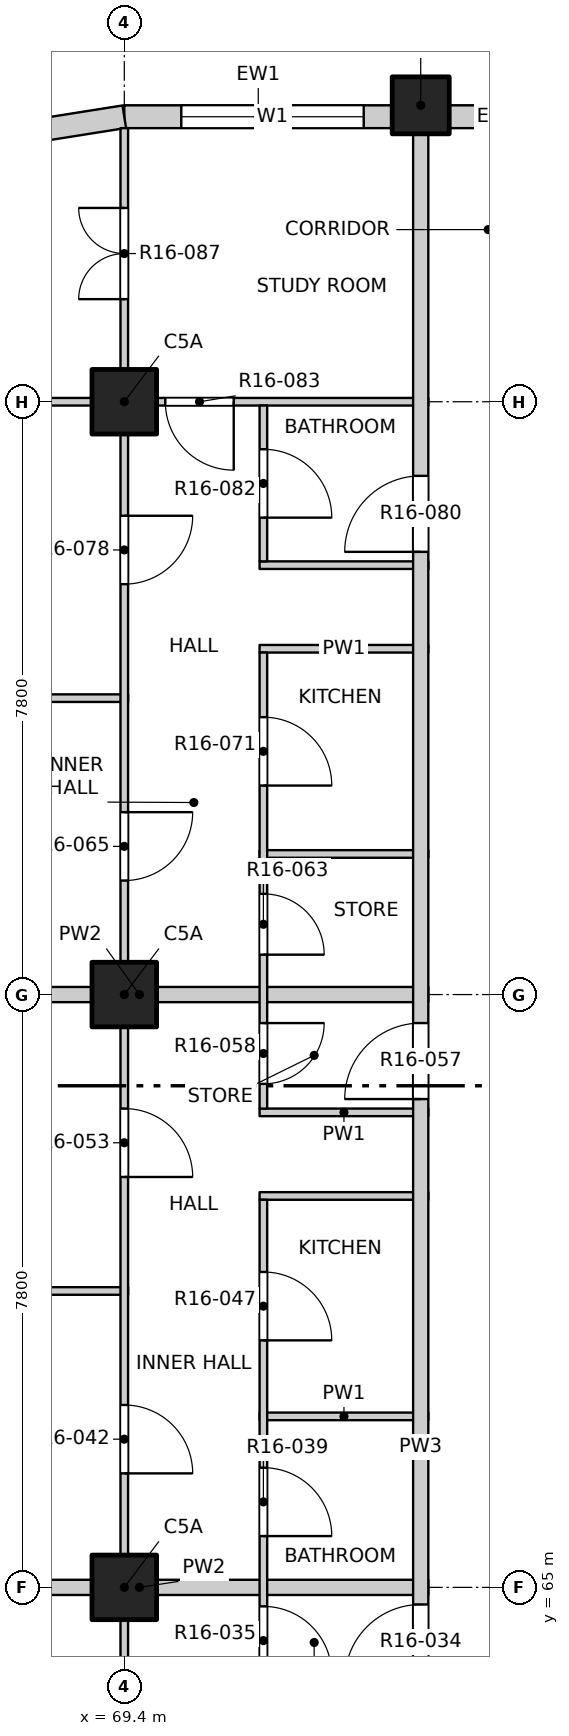
"""IFC4 building model, lengths in metres.
Left out: names, types, materials, properties, quantities, classifications, styles, units other than length and angle.
Written with IfcOpenShell. Run it as: python <this file> out.ifc"""

import sys

from ifc_helpers import new_model, si_unit, direction, frame, frame_2d, origin, origin_2d, place, context, subcontext, project, spatial, rectangle, extrude, element, fill, save


model = new_model("IFC4")
c1 = context("Model", 3, precision=1e-05, world=origin(), true_north=direction((0.0, 1.0)))
c2 = subcontext(c1, "Body", "Model", "MODEL_VIEW")
j1 = project(units=[si_unit("LENGTHUNIT", "METRE"), si_unit("PLANEANGLEUNIT", "RADIAN")], contexts=[c1])
p1 = place(None, origin())
s1 = spatial("IfcSite", under=j1, at=p1, CompositionType="ELEMENT")
p2 = place(p1, origin())
s2 = spatial("IfcBuilding", under=s1, at=p2, CompositionType="ELEMENT")
p3 = place(p2, frame((0.0, 0.0, 169.0)))
s3 = spatial("IfcBuildingStorey", under=s2, at=p3, CompositionType="ELEMENT", Elevation=169.0)
p4 = place(p3, frame((73.3, 84.5, -0.25), z_axis=(0.0, 0.0, 1.0), x_axis=(1.0, 0.0, 0.0)))
e1 = element("IfcColumn", 1, at=p4, inside=s3, PredefinedType="COLUMN", context=c2, shape_type="SweptSolid", body=[
    extrude(rectangle(XDim=0.75, YDim=0.75, at=origin_2d()), origin(), (0.0, 0.0, 1.0), 3.35),
])
for number, where, z_axis, x_axis in (
    (2, (69.4, 65.0, -0.25), (0.0, 0.0, 1.0), (1.0, 0.0, 0.0)),
    (3, (69.4, 72.8, -0.25), (0.0, 0.0, 1.0), (1.0, 0.0, 0.0)),
    (4, (69.4, 80.6, -0.25), (0.0, 0.0, 1.0), (1.0, 0.0, 0.0)),
):
    element("IfcColumn", number, at=place(p3, frame(where, z_axis=z_axis, x_axis=x_axis)), inside=s3, PredefinedType="COLUMN", context=c2, shape_type="SweptSolid", body=[
        extrude(rectangle(XDim=0.85, YDim=0.85, at=origin_2d()), origin(), (0.0, 0.0, 1.0), 3.35),
    ])
p5 = place(p3, frame((69.4, 84.35, 0.0), z_axis=(0.0, 0.0, 1.0), x_axis=(1.0, 0.0, 0.0)))
e5 = element("IfcWall", 5, at=p5, inside=s3, PredefinedType="SOLIDWALL", context=c2, shape_type="SweptSolid", body=[
    extrude(rectangle(XDim=3.525, YDim=0.3, at=frame_2d((1.763, 0.0))), origin(), (0.0, 0.0, 1.0), 3.1),
])
p6 = place(p5, frame((0.75, 0.0, 0.9)))
e6 = element("IfcOpeningElement", 6, at=p6, cuts=e5, PredefinedType="OPENING", context=c2, shape_type="SweptSolid", body=[
    extrude(rectangle(XDim=2.4, YDim=1.8, at=frame_2d((1.2, 0.9))), frame((0.0, 0.16, 0.0), z_axis=(0.0, -1.0, 0.0), x_axis=(1.0, 0.0, 0.0)), (0.0, 0.0, 1.0), 0.32),
])
p7 = place(p3, frame((73.675, 84.35, 0.0), z_axis=(0.0, 0.0, 1.0), x_axis=(1.0, 0.0, 0.0)))
e7 = element("IfcWall", 7, at=p7, inside=s3, PredefinedType="SOLIDWALL", context=c2, shape_type="SweptSolid", body=[
    extrude(rectangle(XDim=1.3, YDim=0.3, at=frame_2d((0.65, 0.0))), origin(), (0.0, 0.0, 1.0), 3.1),
])
p8 = place(p3, frame((69.4, 84.35, 0.0), z_axis=(0.0, 0.0, 1.0), x_axis=(-0.987678452879, -0.156496880861, 0.0)))
e8 = element("IfcWall", 8, at=p8, inside=s3, PredefinedType="SOLIDWALL", context=c2, shape_type="SweptSolid", body=[
    extrude(rectangle(XDim=1.173, YDim=0.3, at=frame_2d((0.586, 0.0))), origin(), (0.0, 0.0, 1.0), 3.1),
])
p9 = place(p3, frame((65.8, 65.0, 0.0), z_axis=(0.0, 0.0, 1.0), x_axis=(1.0, 0.0, 0.0)))
e9 = element("IfcWall", 9, at=p9, inside=s3, PredefinedType="PARTITIONING", context=c2, shape_type="SweptSolid", body=[
    extrude(rectangle(XDim=7.6, YDim=0.2, at=frame_2d((3.8, 0.0))), origin(), (0.0, 0.0, 1.0), 3.1),
])
p10 = place(p3, frame((71.18, 67.25, 0.0), z_axis=(0.0, 0.0, 1.0), x_axis=(1.0, 0.0, 0.0)))
e10 = element("IfcWall", 10, at=p10, inside=s3, PredefinedType="PARTITIONING", context=c2, shape_type="SweptSolid", body=[
    extrude(rectangle(XDim=2.22, YDim=0.1, at=frame_2d((1.11, 0.0))), origin(), (0.0, 0.0, 1.0), 3.1),
])
p11 = place(p3, frame((65.8, 68.9, 0.0), z_axis=(0.0, 0.0, 1.0), x_axis=(1.0, 0.0, 0.0)))
e11 = element("IfcWall", 11, at=p11, inside=s3, PredefinedType="PARTITIONING", context=c2, shape_type="SweptSolid", body=[
    extrude(rectangle(XDim=3.65, YDim=0.1, at=frame_2d((1.825, 0.0))), origin(), (0.0, 0.0, 1.0), 3.1),
])
for number, where, z_axis, x_axis in (
    (12, (71.18, 70.15, 0.0), (0.0, 0.0, 1.0), (1.0, 0.0, 0.0)),
    (13, (71.18, 71.25, 0.0), (0.0, 0.0, 1.0), (1.0, 0.0, 0.0)),
):
    element("IfcWall", number, at=place(p3, frame(where, z_axis=z_axis, x_axis=x_axis)), inside=s3, PredefinedType="PARTITIONING", context=c2, shape_type="SweptSolid", body=[
        extrude(rectangle(XDim=2.22, YDim=0.1, at=frame_2d((1.11, 0.0))), origin(), (0.0, 0.0, 1.0), 3.1),
    ])
p12 = place(p3, frame((65.8, 72.8, 0.0), z_axis=(0.0, 0.0, 1.0), x_axis=(1.0, 0.0, 0.0)))
e14 = element("IfcWall", 14, at=p12, inside=s3, PredefinedType="PARTITIONING", context=c2, shape_type="SweptSolid", body=[
    extrude(rectangle(XDim=7.6, YDim=0.2, at=frame_2d((3.8, 0.0))), origin(), (0.0, 0.0, 1.0), 3.1),
])
p13 = place(p3, frame((71.18, 74.65, 0.0), z_axis=(0.0, 0.0, 1.0), x_axis=(1.0, 0.0, 0.0)))
e15 = element("IfcWall", 15, at=p13, inside=s3, PredefinedType="PARTITIONING", context=c2, shape_type="SweptSolid", body=[
    extrude(rectangle(XDim=2.22, YDim=0.1, at=frame_2d((1.11, 0.0))), origin(), (0.0, 0.0, 1.0), 3.1),
])
p14 = place(p3, frame((65.8, 76.7, 0.0), z_axis=(0.0, 0.0, 1.0), x_axis=(1.0, 0.0, 0.0)))
e16 = element("IfcWall", 16, at=p14, inside=s3, PredefinedType="PARTITIONING", context=c2, shape_type="SweptSolid", body=[
    extrude(rectangle(XDim=3.65, YDim=0.1, at=frame_2d((1.825, 0.0))), origin(), (0.0, 0.0, 1.0), 3.1),
])
for number, where, z_axis, x_axis in (
    (17, (71.18, 77.35, 0.0), (0.0, 0.0, 1.0), (1.0, 0.0, 0.0)),
    (18, (71.18, 78.45, 0.0), (0.0, 0.0, 1.0), (1.0, 0.0, 0.0)),
):
    element("IfcWall", number, at=place(p3, frame(where, z_axis=z_axis, x_axis=x_axis)), inside=s3, PredefinedType="PARTITIONING", context=c2, shape_type="SweptSolid", body=[
        extrude(rectangle(XDim=2.22, YDim=0.1, at=frame_2d((1.11, 0.0))), origin(), (0.0, 0.0, 1.0), 3.1),
    ])
p15 = place(p3, frame((65.8, 80.6, 0.0), z_axis=(0.0, 0.0, 1.0), x_axis=(1.0, 0.0, 0.0)))
e19 = element("IfcWall", 19, at=p15, inside=s3, PredefinedType="PARTITIONING", context=c2, shape_type="SweptSolid", body=[
    extrude(rectangle(XDim=7.6, YDim=0.1, at=frame_2d((3.8, 0.0))), origin(), (0.0, 0.0, 1.0), 3.1),
])
p16 = place(p15, frame((4.14, 0.0, 0.0)))
e20 = element("IfcOpeningElement", 20, at=p16, cuts=e19, PredefinedType="OPENING", context=c2, shape_type="SweptSolid", body=[
    extrude(rectangle(XDim=0.9, YDim=2.1, at=frame_2d((0.45, 1.05))), frame((0.0, 0.06, 0.0), z_axis=(0.0, -1.0, 0.0), x_axis=(1.0, 0.0, 0.0)), (0.0, 0.0, 1.0), 0.12),
])
p17 = place(p3, frame((69.4, 45.8, 0.0), z_axis=(0.0, 0.0, 1.0), x_axis=(0.0, 1.0, 0.0)))
e21 = element("IfcWall", 21, at=p17, inside=s3, PredefinedType="PARTITIONING", context=c2, shape_type="SweptSolid", body=[
    extrude(rectangle(XDim=38.4, YDim=0.1, at=frame_2d((19.2, 0.0))), origin(), (0.0, 0.0, 1.0), 3.1),
])
p18 = place(p17, frame((1.05, 0.0, 0.0)))
e22 = element("IfcOpeningElement", 22, at=p18, cuts=e21, PredefinedType="OPENING", context=c2, shape_type="SweptSolid", body=[
    extrude(rectangle(XDim=1.2, YDim=2.1, at=frame_2d((0.6, 1.05))), frame((0.0, 0.06, 0.0), z_axis=(0.0, -1.0, 0.0), x_axis=(1.0, 0.0, 0.0)), (0.0, 0.0, 1.0), 0.12),
])
p19 = place(p17, frame((5.1, 0.0, 0.0)))
e23 = element("IfcOpeningElement", 23, at=p19, cuts=e21, PredefinedType="OPENING", context=c2, shape_type="SweptSolid", body=[
    extrude(rectangle(XDim=0.9, YDim=2.1, at=frame_2d((0.45, 1.05))), frame((0.0, 0.06, 0.0), z_axis=(0.0, -1.0, 0.0), x_axis=(1.0, 0.0, 0.0)), (0.0, 0.0, 1.0), 0.12),
])
p20 = place(p17, frame((9.0, 0.0, 0.0)))
e24 = element("IfcOpeningElement", 24, at=p20, cuts=e21, PredefinedType="OPENING", context=c2, shape_type="SweptSolid", body=[
    extrude(rectangle(XDim=0.9, YDim=2.1, at=frame_2d((0.45, 1.05))), frame((0.0, 0.06, 0.0), z_axis=(0.0, -1.0, 0.0), x_axis=(1.0, 0.0, 0.0)), (0.0, 0.0, 1.0), 0.12),
])
p21 = place(p17, frame((12.9, 0.0, 0.0)))
e25 = element("IfcOpeningElement", 25, at=p21, cuts=e21, PredefinedType="OPENING", context=c2, shape_type="SweptSolid", body=[
    extrude(rectangle(XDim=0.9, YDim=2.1, at=frame_2d((0.45, 1.05))), frame((0.0, 0.06, 0.0), z_axis=(0.0, -1.0, 0.0), x_axis=(1.0, 0.0, 0.0)), (0.0, 0.0, 1.0), 0.12),
])
p22 = place(p17, frame((16.8, 0.0, 0.0)))
e26 = element("IfcOpeningElement", 26, at=p22, cuts=e21, PredefinedType="OPENING", context=c2, shape_type="SweptSolid", body=[
    extrude(rectangle(XDim=0.9, YDim=2.1, at=frame_2d((0.45, 1.05))), frame((0.0, 0.06, 0.0), z_axis=(0.0, -1.0, 0.0), x_axis=(1.0, 0.0, 0.0)), (0.0, 0.0, 1.0), 0.12),
])
p23 = place(p17, frame((20.7, 0.0, 0.0)))
e27 = element("IfcOpeningElement", 27, at=p23, cuts=e21, PredefinedType="OPENING", context=c2, shape_type="SweptSolid", body=[
    extrude(rectangle(XDim=0.9, YDim=2.1, at=frame_2d((0.45, 1.05))), frame((0.0, 0.06, 0.0), z_axis=(0.0, -1.0, 0.0), x_axis=(1.0, 0.0, 0.0)), (0.0, 0.0, 1.0), 0.12),
])
p24 = place(p17, frame((24.6, 0.0, 0.0)))
e28 = element("IfcOpeningElement", 28, at=p24, cuts=e21, PredefinedType="OPENING", context=c2, shape_type="SweptSolid", body=[
    extrude(rectangle(XDim=0.9, YDim=2.1, at=frame_2d((0.45, 1.05))), frame((0.0, 0.06, 0.0), z_axis=(0.0, -1.0, 0.0), x_axis=(1.0, 0.0, 0.0)), (0.0, 0.0, 1.0), 0.12),
])
p25 = place(p17, frame((28.5, 0.0, 0.0)))
e29 = element("IfcOpeningElement", 29, at=p25, cuts=e21, PredefinedType="OPENING", context=c2, shape_type="SweptSolid", body=[
    extrude(rectangle(XDim=0.9, YDim=2.1, at=frame_2d((0.45, 1.05))), frame((0.0, 0.06, 0.0), z_axis=(0.0, -1.0, 0.0), x_axis=(1.0, 0.0, 0.0)), (0.0, 0.0, 1.0), 0.12),
])
p26 = place(p17, frame((32.4, 0.0, 0.0)))
e30 = element("IfcOpeningElement", 30, at=p26, cuts=e21, PredefinedType="OPENING", context=c2, shape_type="SweptSolid", body=[
    extrude(rectangle(XDim=0.9, YDim=2.1, at=frame_2d((0.45, 1.05))), frame((0.0, 0.06, 0.0), z_axis=(0.0, -1.0, 0.0), x_axis=(1.0, 0.0, 0.0)), (0.0, 0.0, 1.0), 0.12),
])
p27 = place(p17, frame((36.15, 0.0, 0.0)))
e31 = element("IfcOpeningElement", 31, at=p27, cuts=e21, PredefinedType="OPENING", context=c2, shape_type="SweptSolid", body=[
    extrude(rectangle(XDim=1.2, YDim=2.1, at=frame_2d((0.6, 1.05))), frame((0.0, 0.06, 0.0), z_axis=(0.0, -1.0, 0.0), x_axis=(1.0, 0.0, 0.0)), (0.0, 0.0, 1.0), 0.12),
])
p28 = place(p3, frame((71.23, 63.65, 0.0), z_axis=(0.0, 0.0, 1.0), x_axis=(0.0, 1.0, 0.0)))
e32 = element("IfcWall", 32, at=p28, inside=s3, PredefinedType="PARTITIONING", context=c2, shape_type="SweptSolid", body=[
    extrude(rectangle(XDim=6.45, YDim=0.1, at=frame_2d((3.225, 0.0))), origin(), (0.0, 0.0, 1.0), 3.1),
])
p29 = place(p28, frame((0.2, 0.0, 0.0)))
e33 = element("IfcOpeningElement", 33, at=p29, cuts=e32, PredefinedType="OPENING", context=c2, shape_type="SweptSolid", body=[
    extrude(rectangle(XDim=0.9, YDim=2.1, at=frame_2d((0.45, 1.05))), frame((0.0, 0.06, 0.0), z_axis=(0.0, -1.0, 0.0), x_axis=(1.0, 0.0, 0.0)), (0.0, 0.0, 1.0), 0.12),
])
p30 = place(p28, frame((2.025, 0.0, 0.0)))
e34 = element("IfcOpeningElement", 34, at=p30, cuts=e32, PredefinedType="OPENING", context=c2, shape_type="SweptSolid", body=[
    extrude(rectangle(XDim=0.9, YDim=2.1, at=frame_2d((0.45, 1.05))), frame((0.0, 0.06, 0.0), z_axis=(0.0, -1.0, 0.0), x_axis=(1.0, 0.0, 0.0)), (0.0, 0.0, 1.0), 0.12),
])
p31 = place(p28, frame((4.6, 0.0, 0.0)))
e35 = element("IfcOpeningElement", 35, at=p31, cuts=e32, PredefinedType="OPENING", context=c2, shape_type="SweptSolid", body=[
    extrude(rectangle(XDim=0.9, YDim=2.1, at=frame_2d((0.45, 1.05))), frame((0.0, 0.06, 0.0), z_axis=(0.0, -1.0, 0.0), x_axis=(1.0, 0.0, 0.0)), (0.0, 0.0, 1.0), 0.12),
])
p32 = place(p3, frame((71.23, 71.3, 0.0), z_axis=(0.0, 0.0, 1.0), x_axis=(0.0, 1.0, 0.0)))
e36 = element("IfcWall", 36, at=p32, inside=s3, PredefinedType="PARTITIONING", context=c2, shape_type="SweptSolid", body=[
    extrude(rectangle(XDim=6.0, YDim=0.1, at=frame_2d((3.0, 0.0))), origin(), (0.0, 0.0, 1.0), 3.1),
])
p33 = place(p32, frame((0.325, 0.0, 0.0)))
e37 = element("IfcOpeningElement", 37, at=p33, cuts=e36, PredefinedType="OPENING", context=c2, shape_type="SweptSolid", body=[
    extrude(rectangle(XDim=0.8, YDim=2.1, at=frame_2d((0.4, 1.05))), frame((0.0, 0.06, 0.0), z_axis=(0.0, -1.0, 0.0), x_axis=(1.0, 0.0, 0.0)), (0.0, 0.0, 1.0), 0.12),
])
p34 = place(p32, frame((2.025, 0.0, 0.0)))
e38 = element("IfcOpeningElement", 38, at=p34, cuts=e36, PredefinedType="OPENING", context=c2, shape_type="SweptSolid", body=[
    extrude(rectangle(XDim=0.8, YDim=2.1, at=frame_2d((0.4, 1.05))), frame((0.0, 0.06, 0.0), z_axis=(0.0, -1.0, 0.0), x_axis=(1.0, 0.0, 0.0)), (0.0, 0.0, 1.0), 0.12),
])
p35 = place(p32, frame((4.25, 0.0, 0.0)))
e39 = element("IfcOpeningElement", 39, at=p35, cuts=e36, PredefinedType="OPENING", context=c2, shape_type="SweptSolid", body=[
    extrude(rectangle(XDim=0.9, YDim=2.1, at=frame_2d((0.45, 1.05))), frame((0.0, 0.06, 0.0), z_axis=(0.0, -1.0, 0.0), x_axis=(1.0, 0.0, 0.0)), (0.0, 0.0, 1.0), 0.12),
])
p36 = place(p3, frame((71.23, 78.5, 0.0), z_axis=(0.0, 0.0, 1.0), x_axis=(0.0, 1.0, 0.0)))
e40 = element("IfcWall", 40, at=p36, inside=s3, PredefinedType="PARTITIONING", context=c2, shape_type="SweptSolid", body=[
    extrude(rectangle(XDim=2.05, YDim=0.1, at=frame_2d((1.025, 0.0))), origin(), (0.0, 0.0, 1.0), 3.1),
])
p37 = place(p36, frame((0.575, 0.0, 0.0)))
e41 = element("IfcOpeningElement", 41, at=p37, cuts=e40, PredefinedType="OPENING", context=c2, shape_type="SweptSolid", body=[
    extrude(rectangle(XDim=0.9, YDim=2.1, at=frame_2d((0.45, 1.05))), frame((0.0, 0.06, 0.0), z_axis=(0.0, -1.0, 0.0), x_axis=(1.0, 0.0, 0.0)), (0.0, 0.0, 1.0), 0.12),
])
p38 = place(p3, frame((73.3, 49.5, 0.0), z_axis=(0.0, 0.0, 1.0), x_axis=(0.0, 1.0, 0.0)))
e42 = element("IfcWall", 42, at=p38, inside=s3, PredefinedType="PARTITIONING", context=c2, shape_type="SweptSolid", body=[
    extrude(rectangle(XDim=34.7, YDim=0.2, at=frame_2d((17.35, 0.0))), origin(), (0.0, 0.0, 1.0), 3.1),
])
p39 = place(p38, frame((14.275, 0.0, 0.0)))
e43 = element("IfcOpeningElement", 43, at=p39, cuts=e42, PredefinedType="OPENING", context=c2, shape_type="SweptSolid", body=[
    extrude(rectangle(XDim=1.0, YDim=2.1, at=frame_2d((0.5, 1.05))), frame((0.0, 0.11, 0.0), z_axis=(0.0, -1.0, 0.0), x_axis=(1.0, 0.0, 0.0)), (0.0, 0.0, 1.0), 0.22),
])
p40 = place(p38, frame((21.925, 0.0, 0.0)))
e44 = element("IfcOpeningElement", 44, at=p40, cuts=e42, PredefinedType="OPENING", context=c2, shape_type="SweptSolid", body=[
    extrude(rectangle(XDim=1.0, YDim=2.1, at=frame_2d((0.5, 1.05))), frame((0.0, 0.11, 0.0), z_axis=(0.0, -1.0, 0.0), x_axis=(1.0, 0.0, 0.0)), (0.0, 0.0, 1.0), 0.22),
])
p41 = place(p38, frame((29.125, 0.0, 0.0)))
e45 = element("IfcOpeningElement", 45, at=p41, cuts=e42, PredefinedType="OPENING", context=c2, shape_type="SweptSolid", body=[
    extrude(rectangle(XDim=1.0, YDim=2.1, at=frame_2d((0.5, 1.05))), frame((0.0, 0.11, 0.0), z_axis=(0.0, -1.0, 0.0), x_axis=(1.0, 0.0, 0.0)), (0.0, 0.0, 1.0), 0.22),
])
p42 = place(p6, origin())
e46 = element("IfcWindow", 46, at=p42, inside=s3, PartitioningType="DOUBLE_PANEL_VERTICAL", PredefinedType="WINDOW", context=c2, shape_type="SweptSolid", body=[
    extrude(rectangle(XDim=2.4, YDim=1.8, at=frame_2d((1.2, 0.9))), frame((0.0, 0.03, 0.0), z_axis=(0.0, -1.0, 0.0), x_axis=(1.0, 0.0, 0.0)), (0.0, 0.0, 1.0), 0.06),
])
fill(e6, e46)
p43 = place(p39, origin())
e47 = element("IfcDoor", 47, at=p43, inside=s3, OperationType="SINGLE_SWING_RIGHT", PredefinedType="DOOR", context=c2, shape_type="SweptSolid", body=[
    extrude(rectangle(XDim=1.0, YDim=2.1, at=frame_2d((0.5, 1.05))), frame((0.0, 0.025, 0.0), z_axis=(0.0, -1.0, 0.0), x_axis=(1.0, 0.0, 0.0)), (0.0, 0.0, 1.0), 0.05),
])
fill(e43, e47)
p44 = place(p29, origin())
e48 = element("IfcDoor", 48, at=p44, inside=s3, OperationType="SINGLE_SWING_RIGHT", PredefinedType="DOOR", context=c2, shape_type="SweptSolid", body=[
    extrude(rectangle(XDim=0.9, YDim=2.1, at=frame_2d((0.45, 1.05))), frame((0.0, 0.025, 0.0), z_axis=(0.0, -1.0, 0.0), x_axis=(1.0, 0.0, 0.0)), (0.0, 0.0, 1.0), 0.05),
])
fill(e33, e48)
p45 = place(p30, origin())
e49 = element("IfcDoor", 49, at=p45, inside=s3, OperationType="SINGLE_SWING_RIGHT", PredefinedType="DOOR", context=c2, shape_type="SweptSolid", body=[
    extrude(rectangle(XDim=0.9, YDim=2.1, at=frame_2d((0.45, 1.05))), frame((0.0, 0.025, 0.0), z_axis=(0.0, -1.0, 0.0), x_axis=(1.0, 0.0, 0.0)), (0.0, 0.0, 1.0), 0.05),
])
fill(e34, e49)
p46 = place(p23, origin())
e50 = element("IfcDoor", 50, at=p46, inside=s3, OperationType="SINGLE_SWING_RIGHT", PredefinedType="DOOR", context=c2, shape_type="SweptSolid", body=[
    extrude(rectangle(XDim=0.9, YDim=2.1, at=frame_2d((0.45, 1.05))), frame((0.0, 0.025, 0.0), z_axis=(0.0, -1.0, 0.0), x_axis=(1.0, 0.0, 0.0)), (0.0, 0.0, 1.0), 0.05),
])
fill(e27, e50)
p47 = place(p31, origin())
e51 = element("IfcDoor", 51, at=p47, inside=s3, OperationType="SINGLE_SWING_RIGHT", PredefinedType="DOOR", context=c2, shape_type="SweptSolid", body=[
    extrude(rectangle(XDim=0.9, YDim=2.1, at=frame_2d((0.45, 1.05))), frame((0.0, 0.025, 0.0), z_axis=(0.0, -1.0, 0.0), x_axis=(1.0, 0.0, 0.0)), (0.0, 0.0, 1.0), 0.05),
])
fill(e35, e51)
p48 = place(p24, origin())
e52 = element("IfcDoor", 52, at=p48, inside=s3, OperationType="SINGLE_SWING_RIGHT", PredefinedType="DOOR", context=c2, shape_type="SweptSolid", body=[
    extrude(rectangle(XDim=0.9, YDim=2.1, at=frame_2d((0.45, 1.05))), frame((0.0, 0.025, 0.0), z_axis=(0.0, -1.0, 0.0), x_axis=(1.0, 0.0, 0.0)), (0.0, 0.0, 1.0), 0.05),
])
fill(e28, e52)
p49 = place(p40, origin())
e53 = element("IfcDoor", 53, at=p49, inside=s3, OperationType="SINGLE_SWING_RIGHT", PredefinedType="DOOR", context=c2, shape_type="SweptSolid", body=[
    extrude(rectangle(XDim=1.0, YDim=2.1, at=frame_2d((0.5, 1.05))), frame((0.0, 0.025, 0.0), z_axis=(0.0, -1.0, 0.0), x_axis=(1.0, 0.0, 0.0)), (0.0, 0.0, 1.0), 0.05),
])
fill(e44, e53)
p50 = place(p33, origin())
e54 = element("IfcDoor", 54, at=p50, inside=s3, OperationType="SINGLE_SWING_LEFT", PredefinedType="DOOR", context=c2, shape_type="SweptSolid", body=[
    extrude(rectangle(XDim=0.8, YDim=2.1, at=frame_2d((0.4, 1.05))), frame((0.0, 0.025, 0.0), z_axis=(0.0, -1.0, 0.0), x_axis=(1.0, 0.0, 0.0)), (0.0, 0.0, 1.0), 0.05),
])
fill(e37, e54)
p51 = place(p34, origin())
e55 = element("IfcDoor", 55, at=p51, inside=s3, OperationType="SINGLE_SWING_RIGHT", PredefinedType="DOOR", context=c2, shape_type="SweptSolid", body=[
    extrude(rectangle(XDim=0.8, YDim=2.1, at=frame_2d((0.4, 1.05))), frame((0.0, 0.025, 0.0), z_axis=(0.0, -1.0, 0.0), x_axis=(1.0, 0.0, 0.0)), (0.0, 0.0, 1.0), 0.05),
])
fill(e38, e55)
p52 = place(p25, origin())
e56 = element("IfcDoor", 56, at=p52, inside=s3, OperationType="SINGLE_SWING_LEFT", PredefinedType="DOOR", context=c2, shape_type="SweptSolid", body=[
    extrude(rectangle(XDim=0.9, YDim=2.1, at=frame_2d((0.45, 1.05))), frame((0.0, 0.025, 0.0), z_axis=(0.0, -1.0, 0.0), x_axis=(1.0, 0.0, 0.0)), (0.0, 0.0, 1.0), 0.05),
])
fill(e29, e56)
p53 = place(p35, origin())
e57 = element("IfcDoor", 57, at=p53, inside=s3, OperationType="SINGLE_SWING_RIGHT", PredefinedType="DOOR", context=c2, shape_type="SweptSolid", body=[
    extrude(rectangle(XDim=0.9, YDim=2.1, at=frame_2d((0.45, 1.05))), frame((0.0, 0.025, 0.0), z_axis=(0.0, -1.0, 0.0), x_axis=(1.0, 0.0, 0.0)), (0.0, 0.0, 1.0), 0.05),
])
fill(e39, e57)
p54 = place(p26, origin())
e58 = element("IfcDoor", 58, at=p54, inside=s3, OperationType="SINGLE_SWING_LEFT", PredefinedType="DOOR", context=c2, shape_type="SweptSolid", body=[
    extrude(rectangle(XDim=0.9, YDim=2.1, at=frame_2d((0.45, 1.05))), frame((0.0, 0.025, 0.0), z_axis=(0.0, -1.0, 0.0), x_axis=(1.0, 0.0, 0.0)), (0.0, 0.0, 1.0), 0.05),
])
fill(e30, e58)
p55 = place(p41, origin())
e59 = element("IfcDoor", 59, at=p55, inside=s3, OperationType="SINGLE_SWING_RIGHT", PredefinedType="DOOR", context=c2, shape_type="SweptSolid", body=[
    extrude(rectangle(XDim=1.0, YDim=2.1, at=frame_2d((0.5, 1.05))), frame((0.0, 0.025, 0.0), z_axis=(0.0, -1.0, 0.0), x_axis=(1.0, 0.0, 0.0)), (0.0, 0.0, 1.0), 0.05),
])
fill(e45, e59)
p56 = place(p37, origin())
e60 = element("IfcDoor", 60, at=p56, inside=s3, OperationType="SINGLE_SWING_RIGHT", PredefinedType="DOOR", context=c2, shape_type="SweptSolid", body=[
    extrude(rectangle(XDim=0.9, YDim=2.1, at=frame_2d((0.45, 1.05))), frame((0.0, 0.025, 0.0), z_axis=(0.0, -1.0, 0.0), x_axis=(1.0, 0.0, 0.0)), (0.0, 0.0, 1.0), 0.05),
])
fill(e41, e60)
p57 = place(p16, origin())
e61 = element("IfcDoor", 61, at=p57, inside=s3, OperationType="SINGLE_SWING_LEFT", PredefinedType="DOOR", context=c2, shape_type="SweptSolid", body=[
    extrude(rectangle(XDim=0.9, YDim=2.1, at=frame_2d((0.45, 1.05))), frame((0.0, 0.025, 0.0), z_axis=(0.0, -1.0, 0.0), x_axis=(1.0, 0.0, 0.0)), (0.0, 0.0, 1.0), 0.05),
])
fill(e20, e61)
p58 = place(p27, origin())
e62 = element("IfcDoor", 62, at=p58, inside=s3, OperationType="DOUBLE_DOOR_SINGLE_SWING", PredefinedType="DOOR", context=c2, shape_type="SweptSolid", body=[
    extrude(rectangle(XDim=1.2, YDim=2.1, at=frame_2d((0.6, 1.05))), frame((0.0, 0.025, 0.0), z_axis=(0.0, -1.0, 0.0), x_axis=(1.0, 0.0, 0.0)), (0.0, 0.0, 1.0), 0.05),
])
fill(e31, e62)
save(model, sys.argv[1])
